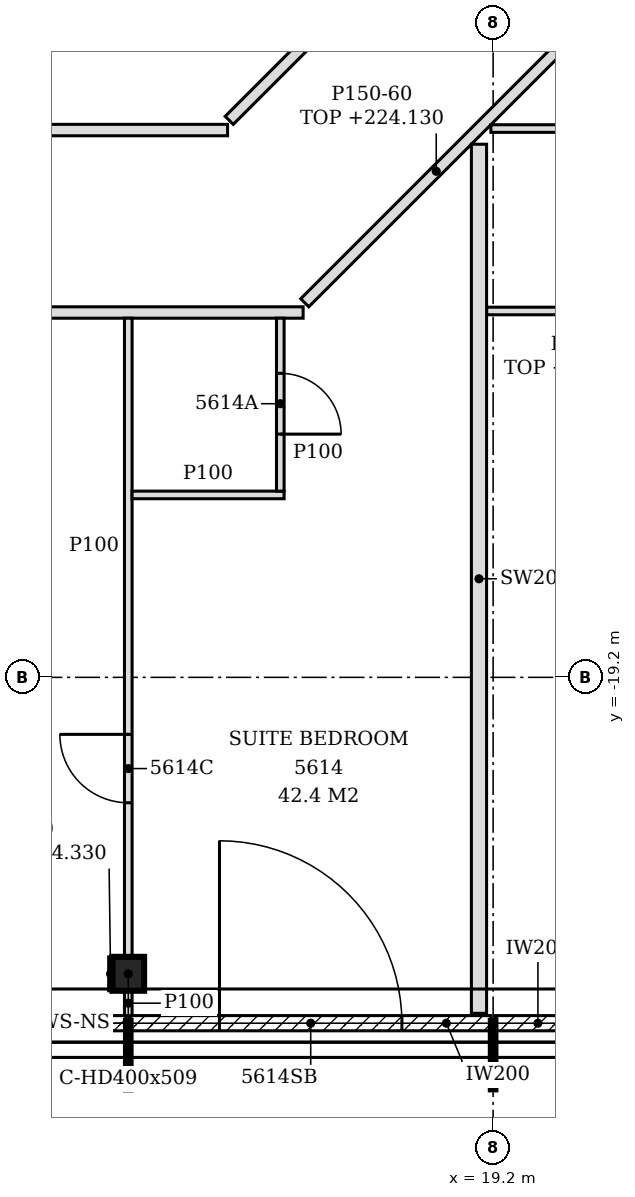
"""IFC4 building model, lengths in metres.
Left out: names, types, materials, properties, quantities, classifications, styles, units other than length and angle.
Written with IfcOpenShell. Run it as: python <this file> out.ifc"""

import sys

from ifc_helpers import new_model, si_unit, direction, frame, frame_2d, origin, origin_2d, place, context, subcontext, project, spatial, polyline, rectangle, i_section, outline, extrude, element, fill, save


model = new_model("IFC4")
c1 = context("Model", 3, precision=1e-05, world=origin(), true_north=direction((0.0, 1.0)))
c2 = subcontext(c1, "Body", "Model", "MODEL_VIEW")
j1 = project(units=[si_unit("LENGTHUNIT", "METRE"), si_unit("PLANEANGLEUNIT", "RADIAN")], contexts=[c1])
p1 = place(None, origin())
s1 = spatial("IfcSite", under=j1, at=p1, CompositionType="ELEMENT")
p2 = place(p1, origin())
s2 = spatial("IfcBuilding", under=s1, at=p2, CompositionType="ELEMENT")
p3 = place(p2, frame((0.0, 0.0, 221.4)))
s3 = spatial("IfcBuildingStorey", under=s2, at=p3, CompositionType="ELEMENT", Elevation=221.4)
p4 = place(p3, frame((14.4, -23.1, -0.15), z_axis=(0.0, 0.0, 1.0), x_axis=(1.0, 0.0, 0.0)))
e1 = element("IfcColumn", 1, at=p4, inside=s3, PredefinedType="COLUMN", context=c2, shape_type="SweptSolid", body=[
    extrude(i_section(OverallWidth=0.416, OverallDepth=0.446, WebThickness=0.039, FlangeThickness=0.063, FilletRadius=0.015, at=origin_2d()), origin(), (0.0, 0.0, 1.0), 3.6),
])
p5 = place(p3, frame((9.63, -23.75, 0.0), z_axis=(0.0, 0.0, 1.0), x_axis=(1.0, 0.0, 0.0)))
e2 = element("IfcWall", 2, at=p5, inside=s3, PredefinedType="NOTDEFINED", context=c2, shape_type="SweptSolid", body=[
    extrude(rectangle(XDim=4.74, YDim=0.2, at=frame_2d((2.37, 0.0))), origin(), (0.0, 0.0, 1.0), 3.45),
])
p6 = place(p5, frame((1.17, 0.0, 0.0)))
e3 = element("IfcOpeningElement", 3, at=p6, cuts=e2, PredefinedType="OPENING", context=c2, shape_type="SweptSolid", body=[
    extrude(rectangle(XDim=2.4, YDim=2.4, at=frame_2d((1.2, 1.2))), frame((0.0, 0.11, 0.0), z_axis=(0.0, -1.0, 0.0), x_axis=(1.0, 0.0, 0.0)), (0.0, 0.0, 1.0), 0.22),
])
p7 = place(p3, frame((14.43, -23.75, 0.0), z_axis=(0.0, 0.0, 1.0), x_axis=(1.0, 0.0, 0.0)))
e4 = element("IfcWall", 4, at=p7, inside=s3, PredefinedType="NOTDEFINED", context=c2, shape_type="SweptSolid", body=[
    extrude(rectangle(XDim=4.74, YDim=0.2, at=frame_2d((2.37, 0.0))), origin(), (0.0, 0.0, 1.0), 3.45),
])
p8 = place(p7, frame((1.17, 0.0, 0.0)))
e5 = element("IfcOpeningElement", 5, at=p8, cuts=e4, PredefinedType="OPENING", context=c2, shape_type="SweptSolid", body=[
    extrude(rectangle(XDim=2.4, YDim=2.4, at=frame_2d((1.2, 1.2))), frame((0.0, 0.11, 0.0), z_axis=(0.0, -1.0, 0.0), x_axis=(1.0, 0.0, 0.0)), (0.0, 0.0, 1.0), 0.22),
])
p9 = place(p3, frame((19.23, -23.75, 0.0), z_axis=(0.0, 0.0, 1.0), x_axis=(1.0, 0.0, 0.0)))
e6 = element("IfcWall", 6, at=p9, inside=s3, PredefinedType="NOTDEFINED", context=c2, shape_type="SweptSolid", body=[
    extrude(rectangle(XDim=4.626, YDim=0.2, at=frame_2d((2.313, 0.0))), origin(), (0.0, 0.0, 1.0), 3.45),
])
p10 = place(p9, frame((1.119, 0.0, 0.0)))
e7 = element("IfcOpeningElement", 7, at=p10, cuts=e6, PredefinedType="OPENING", context=c2, shape_type="SweptSolid", body=[
    extrude(rectangle(XDim=2.4, YDim=2.4, at=frame_2d((1.2, 1.2))), frame((0.0, 0.11, 0.0), z_axis=(0.0, -1.0, 0.0), x_axis=(1.0, 0.0, 0.0)), (0.0, 0.0, 1.0), 0.22),
])
p11 = place(p3, frame((14.4, -23.65, 0.0), z_axis=(0.0, 0.0, 1.0), x_axis=(0.0, 1.0, 0.0)))
e8 = element("IfcWall", 8, at=p11, inside=s3, PredefinedType="PARTITIONING", context=c2, shape_type="SweptSolid", body=[
    extrude(rectangle(XDim=0.327, YDim=0.1, at=frame_2d((0.164, 0.0))), origin(), (0.0, 0.0, 1.0), 3.45),
])
p12 = place(p3, frame((19.014, -23.62, 0.0), z_axis=(0.0, 0.0, 1.0), x_axis=(0.0, 1.0, 0.0)))
e9 = element("IfcWall", 9, at=p12, inside=s3, PredefinedType="PARTITIONING", context=c2, shape_type="SweptSolid", body=[
    extrude(outline(polyline([(0.0, 0.0), (11.434, 0.0), (11.434, 2.73), (0.64, 2.73), (0.638, 2.93), (0.37, 2.93), (0.368, 3.45), (0.0, 3.45), (0.0, 0.0)])), frame((0.0, 0.1, 0.0), z_axis=(0.0, -1.0, 0.0), x_axis=(1.0, 0.0, 0.0)), (0.0, 0.0, 1.0), 0.2),
])
p13 = place(p3, frame((14.4, -22.877, 0.0), z_axis=(0.0, 0.0, 1.0), x_axis=(0.0, 1.0, 0.0)))
e10 = element("IfcWall", 10, at=p13, inside=s3, PredefinedType="PARTITIONING", context=c2, shape_type="SweptSolid", body=[
    extrude(outline(polyline([(0.0, 0.0), (8.402, 0.0), (8.402, 2.88), (8.372, 2.88), (8.37, 3.45), (3.782, 3.45), (3.78, 2.88), (3.572, 2.88), (3.57, 3.45), (0.0, 3.45), (0.0, 0.0)])), frame((0.0, 0.05, 0.0), z_axis=(0.0, -1.0, 0.0), x_axis=(1.0, 0.0, 0.0)), (0.0, 0.0, 1.0), 0.1),
])
p14 = place(p13, frame((2.027, 0.0, 0.0)))
e11 = element("IfcOpeningElement", 11, at=p14, cuts=e10, PredefinedType="OPENING", context=c2, shape_type="SweptSolid", body=[
    extrude(rectangle(XDim=0.9, YDim=2.1, at=frame_2d((0.45, 1.05))), frame((0.0, 0.06, 0.0), z_axis=(0.0, -1.0, 0.0), x_axis=(1.0, 0.0, 0.0)), (0.0, 0.0, 1.0), 0.12),
])
p15 = place(p3, frame((14.45, -16.8, 0.0), z_axis=(0.0, 0.0, 1.0), x_axis=(1.0, 0.0, 0.0)))
e12 = element("IfcWall", 12, at=p15, inside=s3, PredefinedType="PARTITIONING", context=c2, shape_type="SweptSolid", body=[
    extrude(rectangle(XDim=2.0, YDim=0.1, at=frame_2d((1.0, 0.0))), origin(), (0.0, 0.0, 1.0), 3.45),
])
p16 = place(p3, frame((16.4, -16.75, 0.0), z_axis=(0.0, 0.0, 1.0), x_axis=(0.0, 1.0, 0.0)))
e13 = element("IfcWall", 13, at=p16, inside=s3, PredefinedType="PARTITIONING", context=c2, shape_type="SweptSolid", body=[
    extrude(outline(polyline([(0.0, 0.0), (2.275, 0.0), (2.275, 2.88), (2.245, 2.88), (2.243, 3.45), (0.0, 3.45), (0.0, 0.0)])), frame((0.0, 0.05, 0.0), z_axis=(0.0, -1.0, 0.0), x_axis=(1.0, 0.0, 0.0)), (0.0, 0.0, 1.0), 0.1),
])
p17 = place(p16, frame((0.75, 0.0, 0.0)))
e14 = element("IfcOpeningElement", 14, at=p17, cuts=e13, PredefinedType="OPENING", context=c2, shape_type="SweptSolid", body=[
    extrude(rectangle(XDim=0.8, YDim=2.1, at=frame_2d((0.4, 1.05))), frame((0.0, 0.06, 0.0), z_axis=(0.0, -1.0, 0.0), x_axis=(1.0, 0.0, 0.0)), (0.0, 0.0, 1.0), 0.12),
])
p18 = place(p3, frame((-4.326, -14.4, 0.0), z_axis=(0.0, 0.0, 1.0), x_axis=(1.0, 0.0, 0.0)))
e15 = element("IfcWall", 15, at=p18, inside=s3, PredefinedType="PARTITIONING", context=c2, shape_type="SweptSolid", body=[
    extrude(outline(polyline([(0.0, 0.0), (21.026, 0.0), (21.026, 2.88), (11.676, 2.88), (11.674, 2.73), (11.376, 2.73), (11.374, 2.88), (1.369, 2.88), (1.367, 2.63), (0.229, 2.63), (0.227, 2.88), (0.0, 2.88), (0.0, 0.0)])), frame((0.0, 0.075, 0.0), z_axis=(0.0, -1.0, 0.0), x_axis=(1.0, 0.0, 0.0)), (0.0, 0.0, 1.0), 0.15),
])
p19 = place(p18, frame((5.169, 0.0, 0.0)))
e16 = element("IfcOpeningElement", 16, at=p19, cuts=e15, PredefinedType="OPENING", context=c2, shape_type="SweptSolid", body=[
    extrude(rectangle(XDim=0.9, YDim=2.1, at=frame_2d((0.45, 1.05))), frame((0.0, 0.085, 0.0), z_axis=(0.0, -1.0, 0.0), x_axis=(1.0, 0.0, 0.0)), (0.0, 0.0, 1.0), 0.17),
])
p20 = place(p18, frame((15.969, 0.0, 0.0)))
e17 = element("IfcOpeningElement", 17, at=p20, cuts=e15, PredefinedType="OPENING", context=c2, shape_type="SweptSolid", body=[
    extrude(rectangle(XDim=0.9, YDim=2.1, at=frame_2d((0.45, 1.05))), frame((0.0, 0.085, 0.0), z_axis=(0.0, -1.0, 0.0), x_axis=(1.0, 0.0, 0.0)), (0.0, 0.0, 1.0), 0.17),
])
p21 = place(p3, frame((19.114, -14.38, 0.0), z_axis=(0.0, 0.0, 1.0), x_axis=(1.0, 0.0, 0.0)))
e18 = element("IfcWall", 18, at=p21, inside=s3, PredefinedType="PARTITIONING", context=c2, shape_type="SweptSolid", body=[
    extrude(outline(polyline([(0.0, 0.0), (2.35, 0.0), (2.35, 2.88), (0.236, 2.88), (0.234, 2.73), (0.0, 2.73), (0.0, 0.0)])), frame((0.0, 0.05, 0.0), z_axis=(0.0, -1.0, 0.0), x_axis=(1.0, 0.0, 0.0)), (0.0, 0.0, 1.0), 0.1),
])
p22 = place(p3, frame((16.722, -14.272, 0.0), z_axis=(0.0, 0.0, 1.0), x_axis=(0.707106781187, 0.707106781187, 0.0)))
e19 = element("IfcWall", 19, at=p22, inside=s3, PredefinedType="PARTITIONING", context=c2, shape_type="SweptSolid", body=[
    extrude(rectangle(XDim=20.049, YDim=0.15, at=frame_2d((10.025, 0.0))), origin(), (0.0, 0.0, 1.0), 2.73),
])
p23 = place(p22, frame((4.892, 0.0, 0.0)))
e20 = element("IfcOpeningElement", 20, at=p23, cuts=e19, PredefinedType="OPENING", context=c2, shape_type="SweptSolid", body=[
    extrude(rectangle(XDim=0.9, YDim=2.1, at=frame_2d((0.45, 1.05))), frame((0.0, 0.085, 0.0), z_axis=(0.0, -1.0, 0.0), x_axis=(1.0, 0.0, 0.0)), (0.0, 0.0, 1.0), 0.17),
])
p24 = place(p22, frame((10.042, 0.0, 0.0)))
e21 = element("IfcOpeningElement", 21, at=p24, cuts=e19, PredefinedType="OPENING", context=c2, shape_type="SweptSolid", body=[
    extrude(rectangle(XDim=0.9, YDim=2.1, at=frame_2d((0.45, 1.05))), frame((0.0, 0.085, 0.0), z_axis=(0.0, -1.0, 0.0), x_axis=(1.0, 0.0, 0.0)), (0.0, 0.0, 1.0), 0.17),
])
p25 = place(p22, frame((14.443, 0.0, 0.0)))
e22 = element("IfcOpeningElement", 22, at=p25, cuts=e19, PredefinedType="OPENING", context=c2, shape_type="SweptSolid", body=[
    extrude(rectangle(XDim=0.9, YDim=2.1, at=frame_2d((0.45, 1.05))), frame((0.0, 0.085, 0.0), z_axis=(0.0, -1.0, 0.0), x_axis=(1.0, 0.0, 0.0)), (0.0, 0.0, 1.0), 0.17),
])
p26 = place(p22, frame((17.837, 0.0, 0.0)))
e23 = element("IfcOpeningElement", 23, at=p26, cuts=e19, PredefinedType="OPENING", context=c2, shape_type="SweptSolid", body=[
    extrude(rectangle(XDim=0.9, YDim=2.1, at=frame_2d((0.45, 1.05))), frame((0.0, 0.085, 0.0), z_axis=(0.0, -1.0, 0.0), x_axis=(1.0, 0.0, 0.0)), (0.0, 0.0, 1.0), 0.17),
])
p27 = place(p3, frame((7.125, -12.0, 0.0), z_axis=(0.0, 0.0, 1.0), x_axis=(1.0, 0.0, 0.0)))
e24 = element("IfcWall", 24, at=p27, inside=s3, PredefinedType="PARTITIONING", context=c2, shape_type="SweptSolid", body=[
    extrude(outline(polyline([(0.0, 0.0), (8.581, 0.0), (8.581, 3.45), (0.225, 3.45), (0.223, 2.73), (0.0, 2.73), (0.0, 0.0)])), frame((0.0, 0.075, 0.0), z_axis=(0.0, -1.0, 0.0), x_axis=(1.0, 0.0, 0.0)), (0.0, 0.0, 1.0), 0.15),
])
p28 = place(p27, frame((1.175, 0.0, 0.0)))
e25 = element("IfcOpeningElement", 25, at=p28, cuts=e24, PredefinedType="OPENING", context=c2, shape_type="SweptSolid", body=[
    extrude(rectangle(XDim=0.8, YDim=2.1, at=frame_2d((0.4, 1.05))), frame((0.0, 0.085, 0.0), z_axis=(0.0, -1.0, 0.0), x_axis=(1.0, 0.0, 0.0)), (0.0, 0.0, 1.0), 0.17),
])
p29 = place(p3, frame((19.17, -11.98, 0.0), z_axis=(0.0, 0.0, 1.0), x_axis=(1.0, 0.0, 0.0)))
e26 = element("IfcWall", 26, at=p29, inside=s3, PredefinedType="PARTITIONING", context=c2, shape_type="SweptSolid", body=[
    extrude(outline(polyline([(0.0, 0.0), (2.294, 0.0), (2.294, 3.45), (0.18, 3.45), (0.178, 2.73), (0.0, 2.73), (0.0, 0.0)])), frame((0.0, 0.05, 0.0), z_axis=(0.0, -1.0, 0.0), x_axis=(1.0, 0.0, 0.0)), (0.0, 0.0, 1.0), 0.1),
])
p30 = place(p3, frame((15.728, -11.872, 0.0), z_axis=(0.0, 0.0, 1.0), x_axis=(0.707080416772, 0.707133144618, 0.0)))
e27 = element("IfcWall", 27, at=p30, inside=s3, PredefinedType="PARTITIONING", context=c2, shape_type="SweptSolid", body=[
    extrude(rectangle(XDim=4.63, YDim=0.15, at=frame_2d((2.315, 0.0))), origin(), (0.0, 0.0, 1.0), 3.45),
])
p31 = place(p3, frame((14.167, -23.323, 0.0), z_axis=(0.0, 0.0, 1.0), x_axis=(0.0, 1.0, 0.0)))
e28 = element("IfcWall", 28, at=p31, inside=s3, PredefinedType="PARTITIONING", context=c2, shape_type="SweptSolid", body=[
    extrude(rectangle(XDim=0.446, YDim=0.05, at=frame_2d((0.223, 0.0))), origin(), (0.0, 0.0, 1.0), 2.93),
])
p32 = place(p8, origin())
e29 = element("IfcDoor", 29, at=p32, inside=s3, OperationType="SINGLE_SWING_LEFT", PredefinedType="DOOR", context=c2, shape_type="SweptSolid", body=[
    extrude(rectangle(XDim=2.4, YDim=2.4, at=frame_2d((1.2, 1.2))), frame((0.0, 0.025, 0.0), z_axis=(0.0, -1.0, 0.0), x_axis=(1.0, 0.0, 0.0)), (0.0, 0.0, 1.0), 0.05),
])
fill(e5, e29)
p33 = place(p14, origin())
e30 = element("IfcDoor", 30, at=p33, inside=s3, OperationType="SINGLE_SWING_RIGHT", PredefinedType="DOOR", context=c2, shape_type="SweptSolid", body=[
    extrude(rectangle(XDim=0.9, YDim=2.1, at=frame_2d((0.45, 1.05))), frame((0.0, 0.025, 0.0), z_axis=(0.0, -1.0, 0.0), x_axis=(1.0, 0.0, 0.0)), (0.0, 0.0, 1.0), 0.05),
])
fill(e11, e30)
p34 = place(p17, frame((0.8, 0.0, 0.0), z_axis=(0.0, 0.0, 1.0), x_axis=(-1.0, 0.0, 0.0)))
e31 = element("IfcDoor", 31, at=p34, inside=s3, OperationType="SINGLE_SWING_RIGHT", PredefinedType="DOOR", context=c2, shape_type="SweptSolid", body=[
    extrude(rectangle(XDim=0.8, YDim=2.1, at=frame_2d((0.4, 1.05))), frame((0.0, 0.025, 0.0), z_axis=(0.0, -1.0, 0.0), x_axis=(1.0, 0.0, 0.0)), (0.0, 0.0, 1.0), 0.05),
])
fill(e14, e31)
save(model, sys.argv[1])
